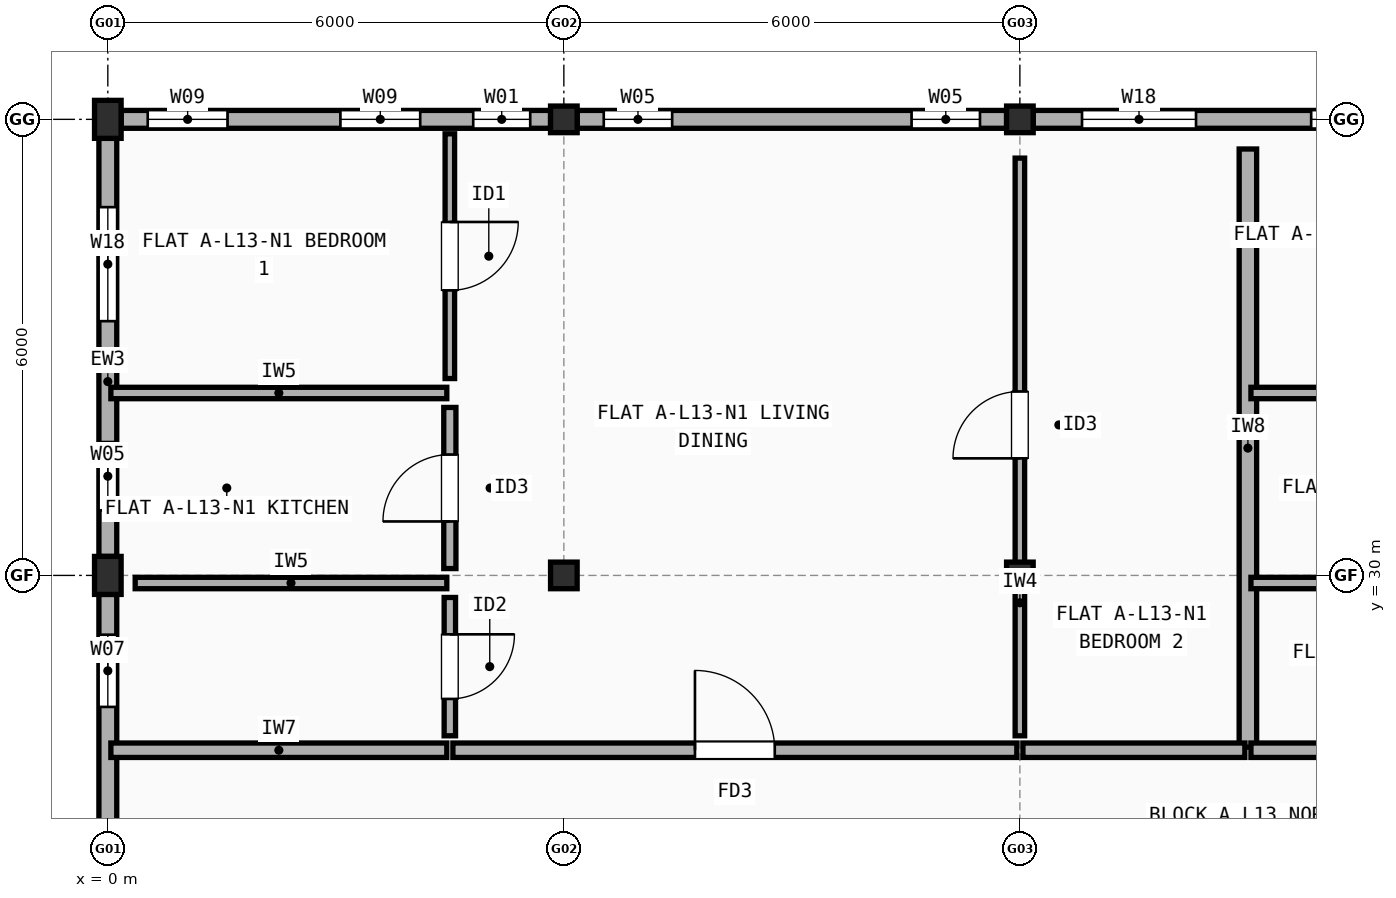
"""IFC4 building model, lengths in metres.
Left out: names, types, materials, properties, quantities, classifications, styles, units other than length and angle.
Written with IfcOpenShell. Run it as: python <this file> out.ifc"""

import sys

from ifc_helpers import new_model, si_unit, direction, frame, frame_2d, origin, origin_2d, place, context, subcontext, project, spatial, rectangle, extrude, element, fill, save


model = new_model("IFC4")
c1 = context("Model", 3, precision=1e-05, world=origin(), true_north=direction((0.0, 1.0)))
c2 = subcontext(c1, "Body", "Model", "MODEL_VIEW")
j1 = project(units=[si_unit("LENGTHUNIT", "METRE"), si_unit("PLANEANGLEUNIT", "RADIAN")], contexts=[c1])
p1 = place(None, origin())
s1 = spatial("IfcSite", under=j1, at=p1, CompositionType="ELEMENT")
p2 = place(p1, origin())
s2 = spatial("IfcBuilding", under=s1, at=p2, CompositionType="ELEMENT")
p3 = place(p2, frame((0.0, 0.0, 42.9)))
s3 = spatial("IfcBuildingStorey", under=s2, at=p3, CompositionType="ELEMENT", Elevation=42.9)
for number, where, z_axis, x_axis in (
    (1, (0.0, 30.0, 0.0), (0.0, 0.0, 1.0), (1.0, 0.0, 0.0)),
    (2, (0.0, 36.0, 0.0), (0.0, 0.0, 1.0), (1.0, 0.0, 0.0)),
):
    element("IfcColumn", number, at=place(p3, frame(where, z_axis=z_axis, x_axis=x_axis)), inside=s3, PredefinedType="COLUMN", context=c2, shape_type="SweptSolid", body=[
        extrude(rectangle(XDim=0.35, YDim=0.5, at=origin_2d()), origin(), (0.0, 0.0, 1.0), 3.005),
    ])
for number, where, z_axis, x_axis in (
    (3, (6.0, 30.0, 0.0), (0.0, 0.0, 1.0), (1.0, 0.0, 0.0)),
    (4, (6.0, 36.0, 0.0), (0.0, 0.0, 1.0), (1.0, 0.0, 0.0)),
    (5, (12.0, 30.0, 0.0), (0.0, 0.0, 1.0), (1.0, 0.0, 0.0)),
    (6, (12.0, 36.0, 0.0), (0.0, 0.0, 1.0), (1.0, 0.0, 0.0)),
):
    element("IfcColumn", number, at=place(p3, frame(where, z_axis=z_axis, x_axis=x_axis)), inside=s3, PredefinedType="COLUMN", context=c2, shape_type="SweptSolid", body=[
        extrude(rectangle(XDim=0.35, YDim=0.35, at=origin_2d()), origin(), (0.0, 0.0, 1.0), 3.005),
    ])
p4 = place(p3, frame((17.825, 36.0, 0.0), z_axis=(0.0, 0.0, 1.0), x_axis=(-1.0, 0.0, 0.0)))
e7 = element("IfcWall", 7, at=p4, inside=s3, PredefinedType="STANDARD", context=c2, shape_type="SweptSolid", body=[
    extrude(rectangle(XDim=5.65, YDim=0.235, at=frame_2d((2.825, 0.0))), origin(), (0.0, 0.0, 1.0), 2.487),
])
p5 = place(p4, frame((0.792, 0.0, 0.9)))
e8 = element("IfcOpeningElement", 8, at=p5, cuts=e7, PredefinedType="OPENING", context=c2, shape_type="SweptSolid", body=[
    extrude(rectangle(XDim=1.2, YDim=1.35, at=frame_2d((0.6, 0.675))), frame((0.0, 0.127, 0.0), z_axis=(0.0, -1.0, 0.0), x_axis=(1.0, 0.0, 0.0)), (0.0, 0.0, 1.0), 0.255),
])
p6 = place(p4, frame((3.508, 0.0, 0.9)))
e9 = element("IfcOpeningElement", 9, at=p6, cuts=e7, PredefinedType="OPENING", context=c2, shape_type="SweptSolid", body=[
    extrude(rectangle(XDim=1.5, YDim=1.4, at=frame_2d((0.75, 0.7))), frame((0.0, 0.127, 0.0), z_axis=(0.0, -1.0, 0.0), x_axis=(1.0, 0.0, 0.0)), (0.0, 0.0, 1.0), 0.255),
])
p7 = place(p3, frame((11.825, 36.0, 0.0), z_axis=(0.0, 0.0, 1.0), x_axis=(-1.0, 0.0, 0.0)))
e10 = element("IfcWall", 10, at=p7, inside=s3, PredefinedType="STANDARD", context=c2, shape_type="SweptSolid", body=[
    extrude(rectangle(XDim=5.65, YDim=0.235, at=frame_2d((2.825, 0.0))), origin(), (0.0, 0.0, 1.0), 2.487),
])
p8 = place(p7, frame((0.35, 0.0, 0.9)))
e11 = element("IfcOpeningElement", 11, at=p8, cuts=e10, PredefinedType="OPENING", context=c2, shape_type="SweptSolid", body=[
    extrude(rectangle(XDim=0.9, YDim=1.4, at=frame_2d((0.45, 0.7))), frame((0.0, 0.127, 0.0), z_axis=(0.0, -1.0, 0.0), x_axis=(1.0, 0.0, 0.0)), (0.0, 0.0, 1.0), 0.255),
])
p9 = place(p7, frame((4.4, 0.0, 0.9)))
e12 = element("IfcOpeningElement", 12, at=p9, cuts=e10, PredefinedType="OPENING", context=c2, shape_type="SweptSolid", body=[
    extrude(rectangle(XDim=0.9, YDim=1.4, at=frame_2d((0.45, 0.7))), frame((0.0, 0.127, 0.0), z_axis=(0.0, -1.0, 0.0), x_axis=(1.0, 0.0, 0.0)), (0.0, 0.0, 1.0), 0.255),
])
p10 = place(p3, frame((5.825, 36.0, 0.0), z_axis=(0.0, 0.0, 1.0), x_axis=(-1.0, 0.0, 0.0)))
e13 = element("IfcWall", 13, at=p10, inside=s3, PredefinedType="STANDARD", context=c2, shape_type="SweptSolid", body=[
    extrude(rectangle(XDim=5.65, YDim=0.235, at=frame_2d((2.825, 0.0))), origin(), (0.0, 0.0, 1.0), 2.487),
])
p11 = place(p10, frame((0.268, 0.0, 0.9)))
e14 = element("IfcOpeningElement", 14, at=p11, cuts=e13, PredefinedType="OPENING", context=c2, shape_type="SweptSolid", body=[
    extrude(rectangle(XDim=0.75, YDim=1.15, at=frame_2d((0.375, 0.575))), frame((0.0, 0.127, 0.0), z_axis=(0.0, -1.0, 0.0), x_axis=(1.0, 0.0, 0.0)), (0.0, 0.0, 1.0), 0.255),
])
p12 = place(p10, frame((1.715, 0.0, 0.9)))
e15 = element("IfcOpeningElement", 15, at=p12, cuts=e13, PredefinedType="OPENING", context=c2, shape_type="SweptSolid", body=[
    extrude(rectangle(XDim=1.05, YDim=1.35, at=frame_2d((0.525, 0.675))), frame((0.0, 0.127, 0.0), z_axis=(0.0, -1.0, 0.0), x_axis=(1.0, 0.0, 0.0)), (0.0, 0.0, 1.0), 0.255),
])
p13 = place(p10, frame((4.25, 0.0, 0.9)))
e16 = element("IfcOpeningElement", 16, at=p13, cuts=e13, PredefinedType="OPENING", context=c2, shape_type="SweptSolid", body=[
    extrude(rectangle(XDim=1.05, YDim=1.35, at=frame_2d((0.525, 0.675))), frame((0.0, 0.127, 0.0), z_axis=(0.0, -1.0, 0.0), x_axis=(1.0, 0.0, 0.0)), (0.0, 0.0, 1.0), 0.255),
])
p14 = place(p3, frame((0.0, 35.75, 0.0), z_axis=(0.0, 0.0, 1.0), x_axis=(0.0, -1.0, 0.0)))
e17 = element("IfcWall", 17, at=p14, inside=s3, PredefinedType="STANDARD", context=c2, shape_type="SweptSolid", body=[
    extrude(rectangle(XDim=5.5, YDim=0.235, at=frame_2d((2.75, 0.0))), origin(), (0.0, 0.0, 1.0), 2.487),
])
p15 = place(p14, frame((0.905, 0.0, 0.9)))
e18 = element("IfcOpeningElement", 18, at=p15, cuts=e17, PredefinedType="OPENING", context=c2, shape_type="SweptSolid", body=[
    extrude(rectangle(XDim=1.5, YDim=1.4, at=frame_2d((0.75, 0.7))), frame((0.0, 0.127, 0.0), z_axis=(0.0, -1.0, 0.0), x_axis=(1.0, 0.0, 0.0)), (0.0, 0.0, 1.0), 0.255),
])
p16 = place(p14, frame((3.995, 0.0, 0.9)))
e19 = element("IfcOpeningElement", 19, at=p16, cuts=e17, PredefinedType="OPENING", context=c2, shape_type="SweptSolid", body=[
    extrude(rectangle(XDim=0.9, YDim=1.4, at=frame_2d((0.45, 0.7))), frame((0.0, 0.127, 0.0), z_axis=(0.0, -1.0, 0.0), x_axis=(1.0, 0.0, 0.0)), (0.0, 0.0, 1.0), 0.255),
])
p17 = place(p3, frame((0.0, 29.75, 0.0), z_axis=(0.0, 0.0, 1.0), x_axis=(0.0, -1.0, 0.0)))
e20 = element("IfcWall", 20, at=p17, inside=s3, PredefinedType="STANDARD", context=c2, shape_type="SweptSolid", body=[
    extrude(rectangle(XDim=5.5, YDim=0.235, at=frame_2d((2.75, 0.0))), origin(), (0.0, 0.0, 1.0), 2.487),
])
p18 = place(p17, frame((0.53, 0.0, 0.9)))
e21 = element("IfcOpeningElement", 21, at=p18, cuts=e20, PredefinedType="OPENING", context=c2, shape_type="SweptSolid", body=[
    extrude(rectangle(XDim=0.95, YDim=1.35, at=frame_2d((0.475, 0.675))), frame((0.0, 0.127, 0.0), z_axis=(0.0, -1.0, 0.0), x_axis=(1.0, 0.0, 0.0)), (0.0, 0.0, 1.0), 0.255),
])
p19 = place(p17, frame((3.295, 0.0, 0.9)))
e22 = element("IfcOpeningElement", 22, at=p19, cuts=e20, PredefinedType="OPENING", context=c2, shape_type="SweptSolid", body=[
    extrude(rectangle(XDim=1.0, YDim=1.4, at=frame_2d((0.5, 0.7))), frame((0.0, 0.127, 0.0), z_axis=(0.0, -1.0, 0.0), x_axis=(1.0, 0.0, 0.0)), (0.0, 0.0, 1.0), 0.255),
])
p20 = place(p3, frame((15.0, 27.74, 0.0), z_axis=(0.0, 0.0, 1.0), x_axis=(0.0, 1.0, 0.0)))
e23 = element("IfcWall", 23, at=p20, inside=s3, PredefinedType="SOLIDWALL", context=c2, shape_type="SweptSolid", body=[
    extrude(rectangle(XDim=7.87, YDim=0.23, at=frame_2d((3.935, 0.0))), origin(), (0.0, 0.0, 1.0), 2.537),
])
p21 = place(p3, frame((0.04, 27.7, 0.0), z_axis=(0.0, 0.0, 1.0), x_axis=(1.0, 0.0, 0.0)))
e24 = element("IfcWall", 24, at=p21, inside=s3, PredefinedType="SOLIDWALL", context=c2, shape_type="SweptSolid", body=[
    extrude(rectangle(XDim=4.42, YDim=0.19, at=frame_2d((2.21, 0.0))), origin(), (0.0, 0.0, 1.0), 2.487),
])
p22 = place(p3, frame((4.54, 27.7, 0.0), z_axis=(0.0, 0.0, 1.0), x_axis=(1.0, 0.0, 0.0)))
e25 = element("IfcWall", 25, at=p22, inside=s3, PredefinedType="SOLIDWALL", context=c2, shape_type="SweptSolid", body=[
    extrude(rectangle(XDim=7.42, YDim=0.19, at=frame_2d((3.71, 0.0))), origin(), (0.0, 0.0, 1.0), 2.508),
])
p23 = place(p22, frame((3.185, 0.0, 0.0)))
e26 = element("IfcOpeningElement", 26, at=p23, cuts=e25, PredefinedType="OPENING", context=c2, shape_type="SweptSolid", body=[
    extrude(rectangle(XDim=1.05, YDim=2.15, at=frame_2d((0.525, 1.075))), frame((0.0, 0.105, 0.0), z_axis=(0.0, -1.0, 0.0), x_axis=(1.0, 0.0, 0.0)), (0.0, 0.0, 1.0), 0.21),
])
p24 = place(p3, frame((4.5, 32.59, 0.0), z_axis=(0.0, 0.0, 1.0), x_axis=(0.0, 1.0, 0.0)))
e27 = element("IfcWall", 27, at=p24, inside=s3, PredefinedType="PARTITIONING", context=c2, shape_type="SweptSolid", body=[
    extrude(rectangle(XDim=3.22, YDim=0.125, at=frame_2d((1.61, 0.0))), origin(), (0.0, 0.0, 1.0), 3.005),
])
p25 = place(p24, frame((1.16, 0.0, 0.0)))
e28 = element("IfcOpeningElement", 28, at=p25, cuts=e27, PredefinedType="OPENING", context=c2, shape_type="SweptSolid", body=[
    extrude(rectangle(XDim=0.9, YDim=2.1, at=frame_2d((0.45, 1.05))), frame((0.0, 0.073, 0.0), z_axis=(0.0, -1.0, 0.0), x_axis=(1.0, 0.0, 0.0)), (0.0, 0.0, 1.0), 0.145),
])
p26 = place(p3, frame((4.5, 30.09, 0.0), z_axis=(0.0, 0.0, 1.0), x_axis=(0.0, 1.0, 0.0)))
e29 = element("IfcWall", 29, at=p26, inside=s3, PredefinedType="PLUMBINGWALL", context=c2, shape_type="SweptSolid", body=[
    extrude(rectangle(XDim=2.12, YDim=0.16, at=frame_2d((1.06, 0.0))), origin(), (0.0, 0.0, 1.0), 2.537),
])
p27 = place(p26, frame((0.62, 0.0, 0.0)))
e30 = element("IfcOpeningElement", 30, at=p27, cuts=e29, PredefinedType="OPENING", context=c2, shape_type="SweptSolid", body=[
    extrude(rectangle(XDim=0.88, YDim=2.1, at=frame_2d((0.44, 1.05))), frame((0.0, 0.09, 0.0), z_axis=(0.0, -1.0, 0.0), x_axis=(1.0, 0.0, 0.0)), (0.0, 0.0, 1.0), 0.18),
])
p28 = place(p3, frame((4.5, 27.89, 0.0), z_axis=(0.0, 0.0, 1.0), x_axis=(0.0, 1.0, 0.0)))
e31 = element("IfcWall", 31, at=p28, inside=s3, PredefinedType="PARTITIONING", context=c2, shape_type="SweptSolid", body=[
    extrude(rectangle(XDim=1.82, YDim=0.15, at=frame_2d((0.91, 0.0))), origin(), (0.0, 0.0, 1.0), 3.005),
])
p29 = place(p28, frame((0.485, 0.0, 0.0)))
e32 = element("IfcOpeningElement", 32, at=p29, cuts=e31, PredefinedType="OPENING", context=c2, shape_type="SweptSolid", body=[
    extrude(rectangle(XDim=0.85, YDim=2.1, at=frame_2d((0.425, 1.05))), frame((0.0, 0.085, 0.0), z_axis=(0.0, -1.0, 0.0), x_axis=(1.0, 0.0, 0.0)), (0.0, 0.0, 1.0), 0.17),
])
p30 = place(p3, frame((0.04, 32.4, 0.0), z_axis=(0.0, 0.0, 1.0), x_axis=(1.0, 0.0, 0.0)))
e33 = element("IfcWall", 33, at=p30, inside=s3, PredefinedType="PARTITIONING", context=c2, shape_type="SweptSolid", body=[
    extrude(rectangle(XDim=4.42, YDim=0.15, at=frame_2d((2.21, 0.0))), origin(), (0.0, 0.0, 1.0), 2.487),
])
p31 = place(p3, frame((0.36, 29.9, 0.0), z_axis=(0.0, 0.0, 1.0), x_axis=(1.0, 0.0, 0.0)))
e34 = element("IfcWall", 34, at=p31, inside=s3, PredefinedType="PARTITIONING", context=c2, shape_type="SweptSolid", body=[
    extrude(rectangle(XDim=4.1, YDim=0.15, at=frame_2d((2.05, 0.0))), origin(), (0.0, 0.0, 1.0), 2.537),
])
p32 = place(p3, frame((12.04, 27.7, 0.0), z_axis=(0.0, 0.0, 1.0), x_axis=(1.0, 0.0, 0.0)))
e35 = element("IfcWall", 35, at=p32, inside=s3, PredefinedType="SOLIDWALL", context=c2, shape_type="SweptSolid", body=[
    extrude(rectangle(XDim=2.92, YDim=0.19, at=frame_2d((1.46, 0.0))), origin(), (0.0, 0.0, 1.0), 2.508),
])
p33 = place(p3, frame((12.0, 27.89, 0.0), z_axis=(0.0, 0.0, 1.0), x_axis=(0.0, 1.0, 0.0)))
e36 = element("IfcWall", 36, at=p33, inside=s3, PredefinedType="PARTITIONING", context=c2, shape_type="SweptSolid", body=[
    extrude(rectangle(XDim=7.6, YDim=0.125, at=frame_2d((3.8, 0.0))), origin(), (0.0, 0.0, 1.0), 2.508),
])
p34 = place(p33, frame((3.65, 0.0, 0.0)))
e37 = element("IfcOpeningElement", 37, at=p34, cuts=e36, PredefinedType="OPENING", context=c2, shape_type="SweptSolid", body=[
    extrude(rectangle(XDim=0.88, YDim=2.1, at=frame_2d((0.44, 1.05))), frame((0.0, 0.073, 0.0), z_axis=(0.0, -1.0, 0.0), x_axis=(1.0, 0.0, 0.0)), (0.0, 0.0, 1.0), 0.145),
])
p35 = place(p3, frame((15.04, 27.7, 0.0), z_axis=(0.0, 0.0, 1.0), x_axis=(1.0, 0.0, 0.0)))
e38 = element("IfcWall", 38, at=p35, inside=s3, PredefinedType="SOLIDWALL", context=c2, shape_type="SweptSolid", body=[
    extrude(rectangle(XDim=4.42, YDim=0.19, at=frame_2d((2.21, 0.0))), origin(), (0.0, 0.0, 1.0), 3.005),
])
p36 = place(p3, frame((15.04, 32.4, 0.0), z_axis=(0.0, 0.0, 1.0), x_axis=(1.0, 0.0, 0.0)))
e39 = element("IfcWall", 39, at=p36, inside=s3, PredefinedType="PARTITIONING", context=c2, shape_type="SweptSolid", body=[
    extrude(rectangle(XDim=4.42, YDim=0.15, at=frame_2d((2.21, 0.0))), origin(), (0.0, 0.0, 1.0), 2.508),
])
p37 = place(p3, frame((15.04, 29.9, 0.0), z_axis=(0.0, 0.0, 1.0), x_axis=(1.0, 0.0, 0.0)))
e40 = element("IfcWall", 40, at=p37, inside=s3, PredefinedType="PARTITIONING", context=c2, shape_type="SweptSolid", body=[
    extrude(rectangle(XDim=4.42, YDim=0.15, at=frame_2d((2.21, 0.0))), origin(), (0.0, 0.0, 1.0), 2.537),
])
p38 = place(p5, origin())
e41 = element("IfcWindow", 41, at=p38, inside=s3, PartitioningType="SINGLE_PANEL", PredefinedType="WINDOW", context=c2, shape_type="SweptSolid", body=[
    extrude(rectangle(XDim=1.2, YDim=1.35, at=frame_2d((0.6, 0.675))), frame((0.0, 0.03, 0.0), z_axis=(0.0, -1.0, 0.0), x_axis=(1.0, 0.0, 0.0)), (0.0, 0.0, 1.0), 0.06),
])
fill(e8, e41)
p39 = place(p6, origin())
e42 = element("IfcWindow", 42, at=p39, inside=s3, PartitioningType="SINGLE_PANEL", PredefinedType="WINDOW", context=c2, shape_type="SweptSolid", body=[
    extrude(rectangle(XDim=1.5, YDim=1.4, at=frame_2d((0.75, 0.7))), frame((0.0, 0.03, 0.0), z_axis=(0.0, -1.0, 0.0), x_axis=(1.0, 0.0, 0.0)), (0.0, 0.0, 1.0), 0.06),
])
fill(e9, e42)
p40 = place(p8, origin())
e43 = element("IfcWindow", 43, at=p40, inside=s3, PartitioningType="SINGLE_PANEL", PredefinedType="WINDOW", context=c2, shape_type="SweptSolid", body=[
    extrude(rectangle(XDim=0.9, YDim=1.4, at=frame_2d((0.45, 0.7))), frame((0.0, 0.03, 0.0), z_axis=(0.0, -1.0, 0.0), x_axis=(1.0, 0.0, 0.0)), (0.0, 0.0, 1.0), 0.06),
])
fill(e11, e43)
p41 = place(p9, origin())
e44 = element("IfcWindow", 44, at=p41, inside=s3, PartitioningType="SINGLE_PANEL", PredefinedType="WINDOW", context=c2, shape_type="SweptSolid", body=[
    extrude(rectangle(XDim=0.9, YDim=1.4, at=frame_2d((0.45, 0.7))), frame((0.0, 0.03, 0.0), z_axis=(0.0, -1.0, 0.0), x_axis=(1.0, 0.0, 0.0)), (0.0, 0.0, 1.0), 0.06),
])
fill(e12, e44)
p42 = place(p11, origin())
e45 = element("IfcWindow", 45, at=p42, inside=s3, PartitioningType="SINGLE_PANEL", PredefinedType="WINDOW", context=c2, shape_type="SweptSolid", body=[
    extrude(rectangle(XDim=0.75, YDim=1.15, at=frame_2d((0.375, 0.575))), frame((0.0, 0.03, 0.0), z_axis=(0.0, -1.0, 0.0), x_axis=(1.0, 0.0, 0.0)), (0.0, 0.0, 1.0), 0.06),
])
fill(e14, e45)
p43 = place(p12, origin())
e46 = element("IfcWindow", 46, at=p43, inside=s3, PartitioningType="SINGLE_PANEL", PredefinedType="WINDOW", context=c2, shape_type="SweptSolid", body=[
    extrude(rectangle(XDim=1.05, YDim=1.35, at=frame_2d((0.525, 0.675))), frame((0.0, 0.03, 0.0), z_axis=(0.0, -1.0, 0.0), x_axis=(1.0, 0.0, 0.0)), (0.0, 0.0, 1.0), 0.06),
])
fill(e15, e46)
p44 = place(p13, origin())
e47 = element("IfcWindow", 47, at=p44, inside=s3, PartitioningType="SINGLE_PANEL", PredefinedType="WINDOW", context=c2, shape_type="SweptSolid", body=[
    extrude(rectangle(XDim=1.05, YDim=1.35, at=frame_2d((0.525, 0.675))), frame((0.0, 0.03, 0.0), z_axis=(0.0, -1.0, 0.0), x_axis=(1.0, 0.0, 0.0)), (0.0, 0.0, 1.0), 0.06),
])
fill(e16, e47)
p45 = place(p15, origin())
e48 = element("IfcWindow", 48, at=p45, inside=s3, PartitioningType="SINGLE_PANEL", PredefinedType="WINDOW", context=c2, shape_type="SweptSolid", body=[
    extrude(rectangle(XDim=1.5, YDim=1.4, at=frame_2d((0.75, 0.7))), frame((0.0, 0.03, 0.0), z_axis=(0.0, -1.0, 0.0), x_axis=(1.0, 0.0, 0.0)), (0.0, 0.0, 1.0), 0.06),
])
fill(e18, e48)
p46 = place(p16, origin())
e49 = element("IfcWindow", 49, at=p46, inside=s3, PartitioningType="SINGLE_PANEL", PredefinedType="WINDOW", context=c2, shape_type="SweptSolid", body=[
    extrude(rectangle(XDim=0.9, YDim=1.4, at=frame_2d((0.45, 0.7))), frame((0.0, 0.03, 0.0), z_axis=(0.0, -1.0, 0.0), x_axis=(1.0, 0.0, 0.0)), (0.0, 0.0, 1.0), 0.06),
])
fill(e19, e49)
p47 = place(p18, origin())
e50 = element("IfcWindow", 50, at=p47, inside=s3, PartitioningType="SINGLE_PANEL", PredefinedType="WINDOW", context=c2, shape_type="SweptSolid", body=[
    extrude(rectangle(XDim=0.95, YDim=1.35, at=frame_2d((0.475, 0.675))), frame((0.0, 0.03, 0.0), z_axis=(0.0, -1.0, 0.0), x_axis=(1.0, 0.0, 0.0)), (0.0, 0.0, 1.0), 0.06),
])
fill(e21, e50)
p48 = place(p23, origin())
e51 = element("IfcDoor", 51, at=p48, inside=s3, OperationType="SINGLE_SWING_LEFT", PredefinedType="DOOR", context=c2, shape_type="SweptSolid", body=[
    extrude(rectangle(XDim=1.05, YDim=2.15, at=frame_2d((0.525, 1.075))), frame((0.0, 0.025, 0.0), z_axis=(0.0, -1.0, 0.0), x_axis=(1.0, 0.0, 0.0)), (0.0, 0.0, 1.0), 0.05),
])
fill(e26, e51)
p49 = place(p25, origin())
e52 = element("IfcDoor", 52, at=p49, inside=s3, OperationType="SINGLE_SWING_RIGHT", PredefinedType="DOOR", context=c2, shape_type="SweptSolid", body=[
    extrude(rectangle(XDim=0.9, YDim=2.1, at=frame_2d((0.45, 1.05))), frame((0.0, 0.025, 0.0), z_axis=(0.0, -1.0, 0.0), x_axis=(1.0, 0.0, 0.0)), (0.0, 0.0, 1.0), 0.05),
])
fill(e28, e52)
p50 = place(p27, origin())
e53 = element("IfcDoor", 53, at=p50, inside=s3, OperationType="SINGLE_SWING_LEFT", PredefinedType="DOOR", context=c2, shape_type="SweptSolid", body=[
    extrude(rectangle(XDim=0.88, YDim=2.1, at=frame_2d((0.44, 1.05))), frame((0.0, 0.025, 0.0), z_axis=(0.0, -1.0, 0.0), x_axis=(1.0, 0.0, 0.0)), (0.0, 0.0, 1.0), 0.05),
])
fill(e30, e53)
p51 = place(p29, origin())
e54 = element("IfcDoor", 54, at=p51, inside=s3, OperationType="SINGLE_SWING_RIGHT", PredefinedType="DOOR", context=c2, shape_type="SweptSolid", body=[
    extrude(rectangle(XDim=0.85, YDim=2.1, at=frame_2d((0.425, 1.05))), frame((0.0, 0.025, 0.0), z_axis=(0.0, -1.0, 0.0), x_axis=(1.0, 0.0, 0.0)), (0.0, 0.0, 1.0), 0.05),
])
fill(e32, e54)
p52 = place(p34, origin())
e55 = element("IfcDoor", 55, at=p52, inside=s3, OperationType="SINGLE_SWING_LEFT", PredefinedType="DOOR", context=c2, shape_type="SweptSolid", body=[
    extrude(rectangle(XDim=0.88, YDim=2.1, at=frame_2d((0.44, 1.05))), frame((0.0, 0.025, 0.0), z_axis=(0.0, -1.0, 0.0), x_axis=(1.0, 0.0, 0.0)), (0.0, 0.0, 1.0), 0.05),
])
fill(e37, e55)
save(model, sys.argv[1])
